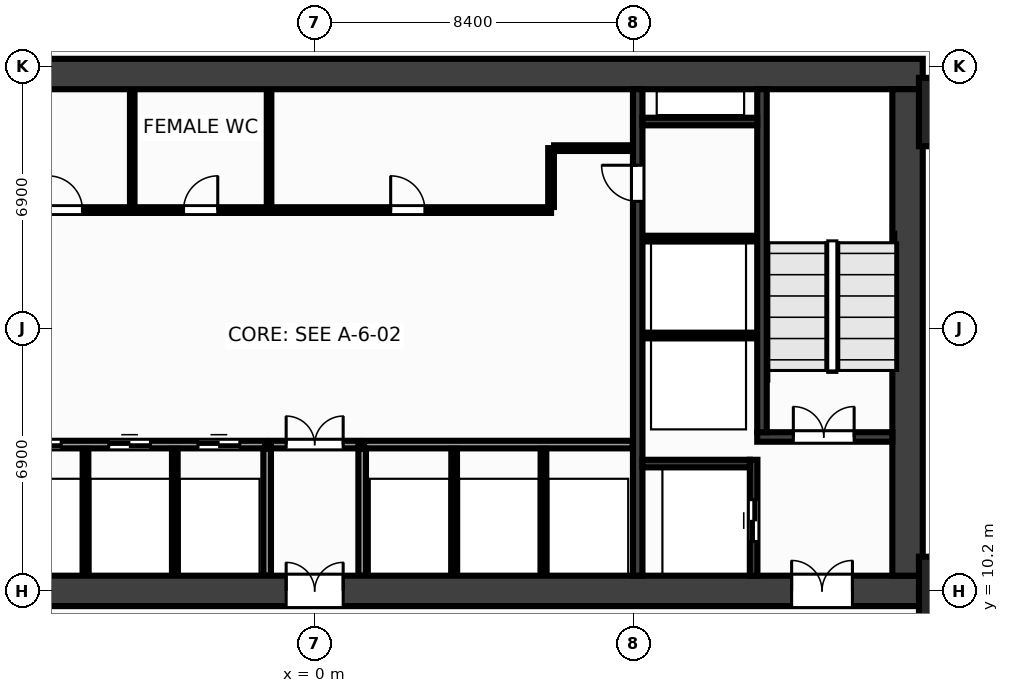
"""IFC4 building model, lengths in metres.
Left out: names, types, materials, properties, quantities, classifications, styles, units other than length and angle.
Written with IfcOpenShell. Run it as: python <this file> out.ifc"""

import sys

from ifc_helpers import new_model, si_unit, direction, frame, frame_2d, origin, origin_2d, place, context, subcontext, project, spatial, rectangle, extrude, source, transform, mapped, element, fill, save


model = new_model("IFC4")
c1 = context("Model", 3, precision=1e-05, world=origin(), true_north=direction((0.0, 1.0)))
c2 = subcontext(c1, "Body", "Model", "MODEL_VIEW")
j1 = project(units=[si_unit("LENGTHUNIT", "METRE"), si_unit("PLANEANGLEUNIT", "RADIAN")], contexts=[c1])
p1 = place(None, origin())
s1 = spatial("IfcSite", under=j1, at=p1, CompositionType="ELEMENT")
p2 = place(p1, origin())
s2 = spatial("IfcBuilding", under=s1, at=p2, CompositionType="ELEMENT")
p3 = place(p2, frame((0.0, 0.0, 5.0)))
s3 = spatial("IfcBuildingStorey", under=s2, at=p3, CompositionType="ELEMENT", Elevation=5.0)
m1 = source(origin(), c2, "Body", "SweptSolid", [
    extrude(rectangle(XDim=32.0, YDim=0.8, at=frame_2d((16.0, 0.0))), origin(), (0.0, 0.0, 1.0), 4.65),
])
p4 = place(p3, frame((-16.0, 23.8, 0.0), z_axis=(0.0, 0.0, 1.0), x_axis=(1.0, 0.0, 0.0)))
e1 = element("IfcWall", 1, at=p4, inside=s3, PredefinedType="SHEAR", context=c2, shape_type="MappedRepresentation", body=[
    mapped(m1, transform((0.0, 0.0, 0.0), x_axis=(1.0, 0.0, 0.0), y_axis=(0.0, 1.0, 0.0), z_axis=(0.0, 0.0, 1.0), scale=1.0)),
])
p5 = place(p3, frame((-16.0, 10.2, 0.0), z_axis=(0.0, 0.0, 1.0), x_axis=(1.0, 0.0, 0.0)))
e2 = element("IfcWall", 2, at=p5, inside=s3, PredefinedType="SHEAR", context=c2, shape_type="MappedRepresentation", body=[
    mapped(m1, transform((0.0, 0.0, 0.0), x_axis=(1.0, 0.0, 0.0), y_axis=(0.0, 1.0, 0.0), z_axis=(0.0, 0.0, 1.0), scale=1.0)),
])
p6 = place(p5, frame((1.85, 0.0, 0.0)))
e3 = element("IfcOpeningElement", 3, at=p6, cuts=e2, PredefinedType="OPENING", context=c2, shape_type="SweptSolid", body=[
    extrude(rectangle(XDim=1.6, YDim=2.15, at=frame_2d((0.8, 1.075))), frame((0.0, 0.412, 0.0), z_axis=(0.0, -1.0, 0.0), x_axis=(1.0, 0.0, 0.0)), (0.0, 0.0, 1.0), 0.824),
])
p7 = place(p5, frame((28.55, 0.0, 0.0)))
e4 = element("IfcOpeningElement", 4, at=p7, cuts=e2, PredefinedType="OPENING", context=c2, shape_type="SweptSolid", body=[
    extrude(rectangle(XDim=1.6, YDim=2.15, at=frame_2d((0.8, 1.075))), frame((0.0, 0.412, 0.0), z_axis=(0.0, -1.0, 0.0), x_axis=(1.0, 0.0, 0.0)), (0.0, 0.0, 1.0), 0.824),
])
p8 = place(p5, frame((15.25, 0.0, 0.0)))
e5 = element("IfcOpeningElement", 5, at=p8, cuts=e2, PredefinedType="OPENING", context=c2, shape_type="SweptSolid", body=[
    extrude(rectangle(XDim=1.5, YDim=2.2, at=frame_2d((0.75, 1.1))), frame((0.0, 0.412, 0.0), z_axis=(0.0, -1.0, 0.0), x_axis=(1.0, 0.0, 0.0)), (0.0, 0.0, 1.0), 0.824),
])
m2 = source(origin(), c2, "Body", "SweptSolid", [
    extrude(rectangle(XDim=12.8, YDim=0.8, at=frame_2d((6.4, 0.0))), origin(), (0.0, 0.0, 1.0), 4.65),
])
p9 = place(p3, frame((15.6, 10.6, 0.0), z_axis=(0.0, 0.0, 1.0), x_axis=(0.0, 1.0, 0.0)))
e6 = element("IfcWall", 6, at=p9, inside=s3, PredefinedType="SHEAR", context=c2, shape_type="MappedRepresentation", body=[
    mapped(m2, transform((0.0, 0.0, 0.0), x_axis=(1.0, 0.0, 0.0), y_axis=(0.0, 1.0, 0.0), z_axis=(0.0, 0.0, 1.0), scale=1.0)),
])
m3 = source(origin(), c2, "Body", "SweptSolid", [
    extrude(rectangle(XDim=12.8, YDim=0.25, at=frame_2d((6.4, 0.0))), origin(), (0.0, 0.0, 1.0), 4.65),
])
p10 = place(p3, frame((8.5, 10.6, 0.0), z_axis=(0.0, 0.0, 1.0), x_axis=(0.0, 1.0, 0.0)))
e7 = element("IfcWall", 7, at=p10, inside=s3, PredefinedType="SHEAR", context=c2, shape_type="MappedRepresentation", body=[
    mapped(m3, transform((0.0, 0.0, 0.0), x_axis=(1.0, 0.0, 0.0), y_axis=(0.0, 1.0, 0.0), z_axis=(0.0, 0.0, 1.0), scale=1.0)),
])
p11 = place(p10, frame((9.85, 0.0, 0.0)))
e8 = element("IfcOpeningElement", 8, at=p11, cuts=e7, PredefinedType="OPENING", context=c2, shape_type="SweptSolid", body=[
    extrude(rectangle(XDim=0.95, YDim=2.15, at=frame_2d((0.475, 1.075))), frame((0.0, 0.137, 0.0), z_axis=(0.0, -1.0, 0.0), x_axis=(1.0, 0.0, 0.0)), (0.0, 0.0, 1.0), 0.274),
])
m4 = source(origin(), c2, "Body", "SweptSolid", [
    extrude(rectangle(XDim=3.555, YDim=0.25, at=frame_2d((1.777, 0.0))), origin(), (0.0, 0.0, 1.0), 4.65),
])
p12 = place(p3, frame((11.645, 14.25, 0.0), z_axis=(0.0, 0.0, 1.0), x_axis=(1.0, 0.0, 0.0)))
e9 = element("IfcWall", 9, at=p12, inside=s3, PredefinedType="SHEAR", context=c2, shape_type="MappedRepresentation", body=[
    mapped(m4, transform((0.0, 0.0, 0.0), x_axis=(1.0, 0.0, 0.0), y_axis=(0.0, 1.0, 0.0), z_axis=(0.0, 0.0, 1.0), scale=1.0)),
])
p13 = place(p12, frame((0.95, 0.0, 0.0)))
e10 = element("IfcOpeningElement", 10, at=p13, cuts=e9, PredefinedType="OPENING", context=c2, shape_type="SweptSolid", body=[
    extrude(rectangle(XDim=1.6, YDim=2.15, at=frame_2d((0.8, 1.075))), frame((0.0, 0.137, 0.0), z_axis=(0.0, -1.0, 0.0), x_axis=(1.0, 0.0, 0.0)), (0.0, 0.0, 1.0), 0.274),
])
m5 = source(origin(), c2, "Body", "SweptSolid", [
    extrude(rectangle(XDim=9.025, YDim=0.25, at=frame_2d((4.512, 0.0))), origin(), (0.0, 0.0, 1.0), 4.65),
])
p14 = place(p3, frame((11.77, 14.375, 0.0), z_axis=(0.0, 0.0, 1.0), x_axis=(0.0, 1.0, 0.0)))
e11 = element("IfcWall", 11, at=p14, inside=s3, PredefinedType="SHEAR", context=c2, shape_type="MappedRepresentation", body=[
    mapped(m5, transform((0.0, 0.0, 0.0), x_axis=(1.0, 0.0, 0.0), y_axis=(0.0, 1.0, 0.0), z_axis=(0.0, 0.0, 1.0), scale=1.0)),
])
m6 = source(origin(), c2, "Body", "SweptSolid", [
    extrude(rectangle(XDim=3.05, YDim=0.2, at=frame_2d((1.525, 0.0))), origin(), (0.0, 0.0, 1.0), 4.65),
])
p15 = place(p3, frame((11.55, 10.6, 0.0), z_axis=(0.0, 0.0, 1.0), x_axis=(0.0, 1.0, 0.0)))
e12 = element("IfcWall", 12, at=p15, inside=s3, PredefinedType="SHEAR", context=c2, shape_type="MappedRepresentation", body=[
    mapped(m6, transform((0.0, 0.0, 0.0), x_axis=(1.0, 0.0, 0.0), y_axis=(0.0, 1.0, 0.0), z_axis=(0.0, 0.0, 1.0), scale=1.0)),
])
p16 = place(p15, frame((0.9, 0.0, 0.0)))
e13 = element("IfcOpeningElement", 13, at=p16, cuts=e12, PredefinedType="OPENING", context=c2, shape_type="SweptSolid", body=[
    extrude(rectangle(XDim=1.1, YDim=2.15, at=frame_2d((0.55, 1.075))), frame((0.0, 0.112, 0.0), z_axis=(0.0, -1.0, 0.0), x_axis=(1.0, 0.0, 0.0)), (0.0, 0.0, 1.0), 0.224),
])
m7 = source(origin(), c2, "Body", "SweptSolid", [
    extrude(rectangle(XDim=2.825, YDim=0.2, at=frame_2d((1.413, 0.0))), origin(), (0.0, 0.0, 1.0), 4.65),
])
p17 = place(p3, frame((8.625, 13.55, 0.0), z_axis=(0.0, 0.0, 1.0), x_axis=(1.0, 0.0, 0.0)))
e14 = element("IfcWall", 14, at=p17, inside=s3, PredefinedType="SHEAR", context=c2, shape_type="MappedRepresentation", body=[
    mapped(m7, transform((0.0, 0.0, 0.0), x_axis=(1.0, 0.0, 0.0), y_axis=(0.0, 1.0, 0.0), z_axis=(0.0, 0.0, 1.0), scale=1.0)),
])
m8 = source(origin(), c2, "Body", "SweptSolid", [
    extrude(rectangle(XDim=3.02, YDim=0.2, at=frame_2d((1.51, 0.0))), origin(), (0.0, 0.0, 1.0), 4.65),
])
p18 = place(p3, frame((8.625, 22.55, 0.0), z_axis=(0.0, 0.0, 1.0), x_axis=(1.0, 0.0, 0.0)))
e15 = element("IfcWall", 15, at=p18, inside=s3, PredefinedType="SHEAR", context=c2, shape_type="MappedRepresentation", body=[
    mapped(m8, transform((0.0, 0.0, 0.0), x_axis=(1.0, 0.0, 0.0), y_axis=(0.0, 1.0, 0.0), z_axis=(0.0, 0.0, 1.0), scale=1.0)),
])
m9 = source(origin(), c2, "Body", "SweptSolid", [
    extrude(rectangle(XDim=1.8, YDim=1.8, at=origin_2d()), origin(), (0.0, 0.0, 1.0), 4.65),
])
for number, where, z_axis, x_axis in (
    (16, (16.8, 10.2, 0.0), (0.0, 0.0, 1.0), (1.0, 0.0, 0.0)),
    (17, (16.8, 22.8, 0.0), (0.0, 0.0, 1.0), (1.0, 0.0, 0.0)),
):
    element("IfcColumn", number, at=place(p3, frame(where, z_axis=z_axis, x_axis=x_axis)), inside=s3, PredefinedType="COLUMN", context=c2, shape_type="MappedRepresentation", body=[
        mapped(m9, transform((0.0, 0.0, 0.0), x_axis=(1.0, 0.0, 0.0), y_axis=(0.0, 1.0, 0.0), z_axis=(0.0, 0.0, 1.0), scale=1.0)),
    ])
m10 = source(origin(), c2, "Body", "SweptSolid", [
    extrude(rectangle(XDim=3.01, YDim=0.15, at=frame_2d((1.505, 0.0))), origin(), (0.0, 0.0, 1.0), 4.37),
])
for number, where, z_axis, x_axis in (
    (18, (8.63, 16.92, 0.0), (0.0, 0.0, 1.0), (1.0, 0.0, 0.0)),
    (19, (8.63, 19.47, 0.0), (0.0, 0.0, 1.0), (1.0, 0.0, 0.0)),
):
    element("IfcWall", number, at=place(p3, frame(where, z_axis=z_axis, x_axis=x_axis)), inside=s3, PredefinedType="PARTITIONING", context=c2, shape_type="MappedRepresentation", body=[
        mapped(m10, transform((0.0, 0.0, 0.0), x_axis=(1.0, 0.0, 0.0), y_axis=(0.0, 1.0, 0.0), z_axis=(0.0, 0.0, 1.0), scale=1.0)),
    ])
m11 = source(origin(), c2, "Body", "SweptSolid", [
    extrude(rectangle(XDim=7.07, YDim=0.2, at=frame_2d((3.535, 0.0))), origin(), (0.0, 0.0, 1.0), 4.37),
])
p19 = place(p3, frame((-8.37, 14.05, 0.0), z_axis=(0.0, 0.0, 1.0), x_axis=(1.0, 0.0, 0.0)))
e20 = element("IfcWall", 20, at=p19, inside=s3, PredefinedType="PARTITIONING", context=c2, shape_type="MappedRepresentation", body=[
    mapped(m11, transform((0.0, 0.0, 0.0), x_axis=(1.0, 0.0, 0.0), y_axis=(0.0, 1.0, 0.0), z_axis=(0.0, 0.0, 1.0), scale=1.0)),
])
p20 = place(p19, frame((0.6, 0.0, 0.0)))
e21 = element("IfcOpeningElement", 21, at=p20, cuts=e20, PredefinedType="OPENING", context=c2, shape_type="SweptSolid", body=[
    extrude(rectangle(XDim=1.1, YDim=2.15, at=frame_2d((0.55, 1.075))), frame((0.0, 0.112, 0.0), z_axis=(0.0, -1.0, 0.0), x_axis=(1.0, 0.0, 0.0)), (0.0, 0.0, 1.0), 0.224),
])
p21 = place(p19, frame((2.95, 0.0, 0.0)))
e22 = element("IfcOpeningElement", 22, at=p21, cuts=e20, PredefinedType="OPENING", context=c2, shape_type="SweptSolid", body=[
    extrude(rectangle(XDim=1.1, YDim=2.15, at=frame_2d((0.55, 1.075))), frame((0.0, 0.112, 0.0), z_axis=(0.0, -1.0, 0.0), x_axis=(1.0, 0.0, 0.0)), (0.0, 0.0, 1.0), 0.224),
])
p22 = place(p19, frame((5.3, 0.0, 0.0)))
e23 = element("IfcOpeningElement", 23, at=p22, cuts=e20, PredefinedType="OPENING", context=c2, shape_type="SweptSolid", body=[
    extrude(rectangle(XDim=1.1, YDim=2.15, at=frame_2d((0.55, 1.075))), frame((0.0, 0.112, 0.0), z_axis=(0.0, -1.0, 0.0), x_axis=(1.0, 0.0, 0.0)), (0.0, 0.0, 1.0), 0.224),
])
p23 = place(p3, frame((1.3, 14.05, 0.0), z_axis=(0.0, 0.0, 1.0), x_axis=(1.0, 0.0, 0.0)))
e24 = element("IfcWall", 24, at=p23, inside=s3, PredefinedType="PARTITIONING", context=c2, shape_type="MappedRepresentation", body=[
    mapped(m11, transform((0.0, 0.0, 0.0), x_axis=(1.0, 0.0, 0.0), y_axis=(0.0, 1.0, 0.0), z_axis=(0.0, 0.0, 1.0), scale=1.0)),
])
m12 = source(origin(), c2, "Body", "SweptSolid", [
    extrude(rectangle(XDim=3.34, YDim=0.2, at=frame_2d((1.67, 0.0))), origin(), (0.0, 0.0, 1.0), 4.37),
])
for number, where, z_axis, x_axis in (
    (25, (-1.25, 10.6, 0.0), (0.0, 0.0, 1.0), (0.0, 1.0, 0.0)),
    (26, (1.25, 10.6, 0.0), (0.0, 0.0, 1.0), (0.0, 1.0, 0.0)),
):
    element("IfcWall", number, at=place(p3, frame(where, z_axis=z_axis, x_axis=x_axis)), inside=s3, PredefinedType="PARTITIONING", context=c2, shape_type="MappedRepresentation", body=[
        mapped(m12, transform((0.0, 0.0, 0.0), x_axis=(1.0, 0.0, 0.0), y_axis=(0.0, 1.0, 0.0), z_axis=(0.0, 0.0, 1.0), scale=1.0)),
    ])
m13 = source(origin(), c2, "Body", "SweptSolid", [
    extrude(rectangle(XDim=2.3, YDim=0.2, at=frame_2d((1.15, 0.0))), origin(), (0.0, 0.0, 1.0), 4.37),
])
p24 = place(p3, frame((-1.15, 14.05, 0.0), z_axis=(0.0, 0.0, 1.0), x_axis=(1.0, 0.0, 0.0)))
e27 = element("IfcWall", 27, at=p24, inside=s3, PredefinedType="PARTITIONING", context=c2, shape_type="MappedRepresentation", body=[
    mapped(m13, transform((0.0, 0.0, 0.0), x_axis=(1.0, 0.0, 0.0), y_axis=(0.0, 1.0, 0.0), z_axis=(0.0, 0.0, 1.0), scale=1.0)),
])
p25 = place(p24, frame((0.4, 0.0, 0.0)))
e28 = element("IfcOpeningElement", 28, at=p25, cuts=e27, PredefinedType="OPENING", context=c2, shape_type="SweptSolid", body=[
    extrude(rectangle(XDim=1.5, YDim=2.2, at=frame_2d((0.75, 1.1))), frame((0.0, 0.112, 0.0), z_axis=(0.0, -1.0, 0.0), x_axis=(1.0, 0.0, 0.0)), (0.0, 0.0, 1.0), 0.224),
])
m14 = source(origin(), c2, "Body", "SweptSolid", [
    extrude(rectangle(XDim=14.59, YDim=0.15, at=frame_2d((7.295, 0.0))), origin(), (0.0, 0.0, 1.0), 4.37),
])
p26 = place(p3, frame((-8.37, 20.22, 0.0), z_axis=(0.0, 0.0, 1.0), x_axis=(1.0, 0.0, 0.0)))
e29 = element("IfcWall", 29, at=p26, inside=s3, PredefinedType="PARTITIONING", context=c2, shape_type="MappedRepresentation", body=[
    mapped(m14, transform((0.0, 0.0, 0.0), x_axis=(1.0, 0.0, 0.0), y_axis=(0.0, 1.0, 0.0), z_axis=(0.0, 0.0, 1.0), scale=1.0)),
])
p27 = place(p26, frame((1.36, 0.0, 0.0)))
e30 = element("IfcOpeningElement", 30, at=p27, cuts=e29, PredefinedType="OPENING", context=c2, shape_type="SweptSolid", body=[
    extrude(rectangle(XDim=0.9, YDim=2.15, at=frame_2d((0.45, 1.075))), frame((0.0, 0.087, 0.0), z_axis=(0.0, -1.0, 0.0), x_axis=(1.0, 0.0, 0.0)), (0.0, 0.0, 1.0), 0.174),
])
p28 = place(p26, frame((4.92, 0.0, 0.0)))
e31 = element("IfcOpeningElement", 31, at=p28, cuts=e29, PredefinedType="OPENING", context=c2, shape_type="SweptSolid", body=[
    extrude(rectangle(XDim=0.9, YDim=2.15, at=frame_2d((0.45, 1.075))), frame((0.0, 0.087, 0.0), z_axis=(0.0, -1.0, 0.0), x_axis=(1.0, 0.0, 0.0)), (0.0, 0.0, 1.0), 0.174),
])
p29 = place(p26, frame((10.37, 0.0, 0.0)))
e32 = element("IfcOpeningElement", 32, at=p29, cuts=e29, PredefinedType="OPENING", context=c2, shape_type="SweptSolid", body=[
    extrude(rectangle(XDim=0.9, YDim=2.15, at=frame_2d((0.45, 1.075))), frame((0.0, 0.087, 0.0), z_axis=(0.0, -1.0, 0.0), x_axis=(1.0, 0.0, 0.0)), (0.0, 0.0, 1.0), 0.174),
])
m15 = source(origin(), c2, "Body", "SweptSolid", [
    extrude(rectangle(XDim=1.55, YDim=0.15, at=frame_2d((0.775, 0.0))), origin(), (0.0, 0.0, 1.0), 4.37),
])
p30 = place(p3, frame((6.22, 20.3, 0.0), z_axis=(0.0, 0.0, 1.0), x_axis=(0.0, 1.0, 0.0)))
e33 = element("IfcWall", 33, at=p30, inside=s3, PredefinedType="PARTITIONING", context=c2, shape_type="MappedRepresentation", body=[
    mapped(m15, transform((0.0, 0.0, 0.0), x_axis=(1.0, 0.0, 0.0), y_axis=(0.0, 1.0, 0.0), z_axis=(0.0, 0.0, 1.0), scale=1.0)),
])
m16 = source(origin(), c2, "Body", "SweptSolid", [
    extrude(rectangle(XDim=2.07, YDim=0.15, at=frame_2d((1.035, 0.0))), origin(), (0.0, 0.0, 1.0), 4.37),
])
p31 = place(p3, frame((6.3, 21.85, 0.0), z_axis=(0.0, 0.0, 1.0), x_axis=(1.0, 0.0, 0.0)))
e34 = element("IfcWall", 34, at=p31, inside=s3, PredefinedType="PARTITIONING", context=c2, shape_type="MappedRepresentation", body=[
    mapped(m16, transform((0.0, 0.0, 0.0), x_axis=(1.0, 0.0, 0.0), y_axis=(0.0, 1.0, 0.0), z_axis=(0.0, 0.0, 1.0), scale=1.0)),
])
m17 = source(origin(), c2, "Body", "SweptSolid", [
    extrude(rectangle(XDim=3.34, YDim=0.15, at=frame_2d((1.67, 0.0))), origin(), (0.0, 0.0, 1.0), 4.37),
])
for number, where, z_axis, x_axis in (
    (35, (-6.03, 10.6, 0.0), (0.0, 0.0, 1.0), (0.0, 1.0, 0.0)),
    (36, (-3.68, 10.6, 0.0), (0.0, 0.0, 1.0), (0.0, 1.0, 0.0)),
    (37, (3.67, 10.6, 0.0), (0.0, 0.0, 1.0), (0.0, 1.0, 0.0)),
    (38, (6.02, 10.6, 0.0), (0.0, 0.0, 1.0), (0.0, 1.0, 0.0)),
):
    element("IfcWall", number, at=place(p3, frame(where, z_axis=z_axis, x_axis=x_axis)), inside=s3, PredefinedType="PARTITIONING", context=c2, shape_type="MappedRepresentation", body=[
        mapped(m17, transform((0.0, 0.0, 0.0), x_axis=(1.0, 0.0, 0.0), y_axis=(0.0, 1.0, 0.0), z_axis=(0.0, 0.0, 1.0), scale=1.0)),
    ])
m18 = source(origin(), c2, "Body", "SweptSolid", [
    extrude(rectangle(XDim=3.04, YDim=0.12, at=frame_2d((1.52, 0.0))), origin(), (0.0, 0.0, 1.0), 4.37),
])
for number, where, z_axis, x_axis in (
    (39, (-4.8, 20.32, 0.0), (0.0, 0.0, 1.0), (0.0, 1.0, 0.0)),
    (40, (-1.2, 20.32, 0.0), (0.0, 0.0, 1.0), (0.0, 1.0, 0.0)),
):
    element("IfcWall", number, at=place(p3, frame(where, z_axis=z_axis, x_axis=x_axis)), inside=s3, PredefinedType="PARTITIONING", context=c2, shape_type="MappedRepresentation", body=[
        mapped(m18, transform((0.0, 0.0, 0.0), x_axis=(1.0, 0.0, 0.0), y_axis=(0.0, 1.0, 0.0), z_axis=(0.0, 0.0, 1.0), scale=1.0)),
    ])
m19 = source(origin(), c2, "Body", "SweptSolid", [
    extrude(rectangle(XDim=1.6, YDim=2.15, at=frame_2d((0.8, 1.075))), frame((0.0, 0.025, 0.0), z_axis=(0.0, -1.0, 0.0), x_axis=(1.0, 0.0, 0.0)), (0.0, 0.0, 1.0), 0.05),
])
p32 = place(p13, origin())
e41 = element("IfcDoor", 41, at=p32, inside=s3, OperationType="DOUBLE_DOOR_SINGLE_SWING", PredefinedType="DOOR", context=c2, shape_type="MappedRepresentation", body=[
    mapped(m19, transform((0.0, 0.0, 0.0), x_axis=(1.0, 0.0, 0.0), y_axis=(0.0, 1.0, 0.0), z_axis=(0.0, 0.0, 1.0), scale=1.0)),
])
fill(e10, e41)
p33 = place(p7, origin())
e42 = element("IfcDoor", 42, at=p33, inside=s3, OperationType="DOUBLE_DOOR_SINGLE_SWING", PredefinedType="DOOR", context=c2, shape_type="MappedRepresentation", body=[
    mapped(m19, transform((0.0, 0.0, 0.0), x_axis=(1.0, 0.0, 0.0), y_axis=(0.0, 1.0, 0.0), z_axis=(0.0, 0.0, 1.0), scale=1.0)),
])
fill(e4, e42)
m20 = source(origin(), c2, "Body", "SweptSolid", [
    extrude(rectangle(XDim=1.1, YDim=2.15, at=frame_2d((0.55, 1.075))), frame((0.0, 0.025, 0.0), z_axis=(0.0, -1.0, 0.0), x_axis=(1.0, 0.0, 0.0)), (0.0, 0.0, 1.0), 0.05),
])
p34 = place(p16, origin())
e43 = element("IfcDoor", 43, at=p34, inside=s3, OperationType="DOUBLE_DOOR_SLIDING", PredefinedType="DOOR", context=c2, shape_type="MappedRepresentation", body=[
    mapped(m20, transform((0.0, 0.0, 0.0), x_axis=(1.0, 0.0, 0.0), y_axis=(0.0, 1.0, 0.0), z_axis=(0.0, 0.0, 1.0), scale=1.0)),
])
fill(e13, e43)
m21 = source(origin(), c2, "Body", "SweptSolid", [
    extrude(rectangle(XDim=0.95, YDim=2.15, at=frame_2d((0.475, 1.075))), frame((0.0, 0.025, 0.0), z_axis=(0.0, -1.0, 0.0), x_axis=(1.0, 0.0, 0.0)), (0.0, 0.0, 1.0), 0.05),
])
p35 = place(p11, origin())
e44 = element("IfcDoor", 44, at=p35, inside=s3, OperationType="SINGLE_SWING_RIGHT", PredefinedType="DOOR", context=c2, shape_type="MappedRepresentation", body=[
    mapped(m21, transform((0.0, 0.0, 0.0), x_axis=(1.0, 0.0, 0.0), y_axis=(0.0, 1.0, 0.0), z_axis=(0.0, 0.0, 1.0), scale=1.0)),
])
fill(e8, e44)
p36 = place(p20, origin())
e45 = element("IfcDoor", 45, at=p36, inside=s3, OperationType="DOUBLE_DOOR_SLIDING", PredefinedType="DOOR", context=c2, shape_type="MappedRepresentation", body=[
    mapped(m20, transform((0.0, 0.0, 0.0), x_axis=(1.0, 0.0, 0.0), y_axis=(0.0, 1.0, 0.0), z_axis=(0.0, 0.0, 1.0), scale=1.0)),
])
fill(e21, e45)
p37 = place(p21, origin())
e46 = element("IfcDoor", 46, at=p37, inside=s3, OperationType="DOUBLE_DOOR_SLIDING", PredefinedType="DOOR", context=c2, shape_type="MappedRepresentation", body=[
    mapped(m20, transform((0.0, 0.0, 0.0), x_axis=(1.0, 0.0, 0.0), y_axis=(0.0, 1.0, 0.0), z_axis=(0.0, 0.0, 1.0), scale=1.0)),
])
fill(e22, e46)
p38 = place(p22, origin())
e47 = element("IfcDoor", 47, at=p38, inside=s3, OperationType="DOUBLE_DOOR_SLIDING", PredefinedType="DOOR", context=c2, shape_type="MappedRepresentation", body=[
    mapped(m20, transform((0.0, 0.0, 0.0), x_axis=(1.0, 0.0, 0.0), y_axis=(0.0, 1.0, 0.0), z_axis=(0.0, 0.0, 1.0), scale=1.0)),
])
fill(e23, e47)
m22 = source(origin(), c2, "Body", "SweptSolid", [
    extrude(rectangle(XDim=1.5, YDim=2.2, at=frame_2d((0.75, 1.1))), frame((0.0, 0.025, 0.0), z_axis=(0.0, -1.0, 0.0), x_axis=(1.0, 0.0, 0.0)), (0.0, 0.0, 1.0), 0.05),
])
p39 = place(p25, origin())
e48 = element("IfcDoor", 48, at=p39, inside=s3, OperationType="DOUBLE_DOOR_SINGLE_SWING", PredefinedType="DOOR", context=c2, shape_type="MappedRepresentation", body=[
    mapped(m22, transform((0.0, 0.0, 0.0), x_axis=(1.0, 0.0, 0.0), y_axis=(0.0, 1.0, 0.0), z_axis=(0.0, 0.0, 1.0), scale=1.0)),
])
fill(e28, e48)
p40 = place(p8, origin())
e49 = element("IfcDoor", 49, at=p40, inside=s3, OperationType="DOUBLE_DOOR_SINGLE_SWING", PredefinedType="DOOR", context=c2, shape_type="MappedRepresentation", body=[
    mapped(m22, transform((0.0, 0.0, 0.0), x_axis=(1.0, 0.0, 0.0), y_axis=(0.0, 1.0, 0.0), z_axis=(0.0, 0.0, 1.0), scale=1.0)),
])
fill(e5, e49)
m23 = source(origin(), c2, "Body", "SweptSolid", [
    extrude(rectangle(XDim=0.9, YDim=2.15, at=frame_2d((0.45, 1.075))), frame((0.0, 0.025, 0.0), z_axis=(0.0, -1.0, 0.0), x_axis=(1.0, 0.0, 0.0)), (0.0, 0.0, 1.0), 0.05),
])
p41 = place(p27, origin())
e50 = element("IfcDoor", 50, at=p41, inside=s3, OperationType="SINGLE_SWING_LEFT", PredefinedType="DOOR", context=c2, shape_type="MappedRepresentation", body=[
    mapped(m23, transform((0.0, 0.0, 0.0), x_axis=(1.0, 0.0, 0.0), y_axis=(0.0, 1.0, 0.0), z_axis=(0.0, 0.0, 1.0), scale=1.0)),
])
fill(e30, e50)
p42 = place(p28, origin())
e51 = element("IfcDoor", 51, at=p42, inside=s3, OperationType="SINGLE_SWING_RIGHT", PredefinedType="DOOR", context=c2, shape_type="MappedRepresentation", body=[
    mapped(m23, transform((0.0, 0.0, 0.0), x_axis=(1.0, 0.0, 0.0), y_axis=(0.0, 1.0, 0.0), z_axis=(0.0, 0.0, 1.0), scale=1.0)),
])
fill(e31, e51)
p43 = place(p29, origin())
e52 = element("IfcDoor", 52, at=p43, inside=s3, OperationType="SINGLE_SWING_LEFT", PredefinedType="DOOR", context=c2, shape_type="MappedRepresentation", body=[
    mapped(m23, transform((0.0, 0.0, 0.0), x_axis=(1.0, 0.0, 0.0), y_axis=(0.0, 1.0, 0.0), z_axis=(0.0, 0.0, 1.0), scale=1.0)),
])
fill(e32, e52)
save(model, sys.argv[1])
